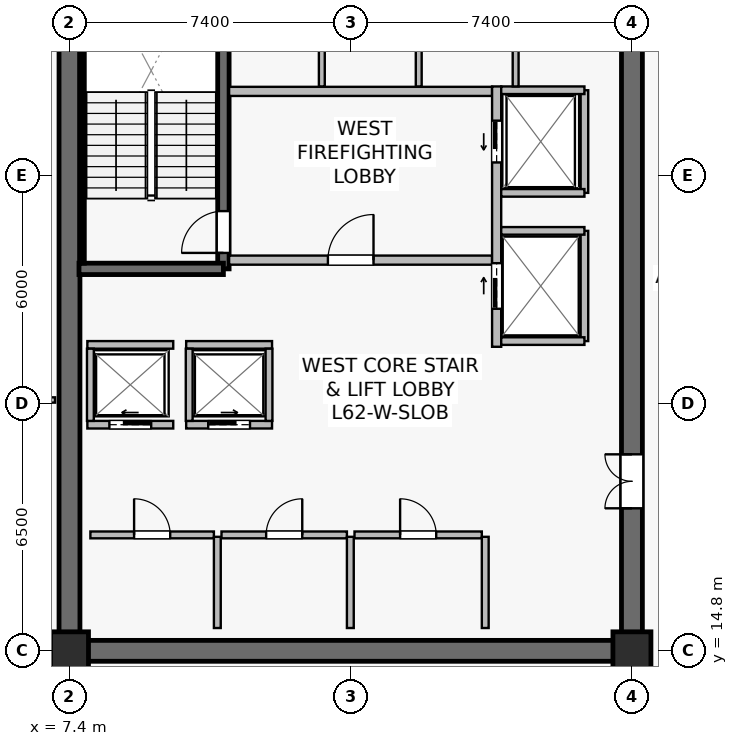
"""IFC4 building model, lengths in metres.
Left out: names, types, materials, properties, quantities, classifications, styles, units other than length and angle.
Written with IfcOpenShell. Run it as: python <this file> out.ifc"""

import sys

from ifc_helpers import new_model, si_unit, direction, frame, frame_2d, origin, origin_2d, place, context, subcontext, project, spatial, rectangle, extrude, source, transform, mapped, element, fill, save


model = new_model("IFC4")
c1 = context("Model", 3, precision=1e-05, world=origin(), true_north=direction((0.0, 1.0)))
c2 = subcontext(c1, "Body", "Model", "MODEL_VIEW")
j1 = project(units=[si_unit("LENGTHUNIT", "METRE"), si_unit("PLANEANGLEUNIT", "RADIAN")], contexts=[c1])
p1 = place(None, origin())
s1 = spatial("IfcSite", under=j1, at=p1, CompositionType="ELEMENT")
p2 = place(p1, origin())
s2 = spatial("IfcBuilding", under=s1, at=p2, CompositionType="ELEMENT")
p3 = place(p2, frame((0.0, 0.0, 258.8)))
s3 = spatial("IfcBuildingStorey", under=s2, at=p3, CompositionType="ELEMENT", Elevation=258.8)
p4 = place(p3, frame((7.125, 14.8, 0.0), z_axis=(0.0, 0.0, 1.0), x_axis=(1.0, 0.0, 0.0)))
e1 = element("IfcWall", 1, at=p4, inside=s3, PredefinedType="SHEAR", context=c2, shape_type="SweptSolid", body=[
    extrude(rectangle(XDim=15.35, YDim=0.55, at=frame_2d((7.675, 0.0))), origin(), (0.0, 0.0, 1.0), 3.8),
])
p5 = place(p3, frame((7.4, 15.075, 0.0), z_axis=(0.0, 0.0, 1.0), x_axis=(0.0, 1.0, 0.0)))
e2 = element("IfcWall", 2, at=p5, inside=s3, PredefinedType="SHEAR", context=c2, shape_type="SweptSolid", body=[
    extrude(rectangle(XDim=18.45, YDim=0.55, at=frame_2d((9.225, 0.0))), origin(), (0.0, 0.0, 1.0), 3.8),
])
p6 = place(p3, frame((22.2, 15.075, 0.0), z_axis=(0.0, 0.0, 1.0), x_axis=(0.0, 1.0, 0.0)))
e3 = element("IfcWall", 3, at=p6, inside=s3, PredefinedType="SHEAR", context=c2, shape_type="SweptSolid", body=[
    extrude(rectangle(XDim=18.45, YDim=0.55, at=frame_2d((9.225, 0.0))), origin(), (0.0, 0.0, 1.0), 3.8),
])
p7 = place(p6, frame((3.475, 0.0, 0.0)))
e4 = element("IfcOpeningElement", 4, at=p7, cuts=e3, PredefinedType="OPENING", context=c2, shape_type="SweptSolid", body=[
    extrude(rectangle(XDim=1.42, YDim=2.2, at=frame_2d((0.71, 1.1))), frame((0.0, 0.285, 0.0), z_axis=(0.0, -1.0, 0.0), x_axis=(1.0, 0.0, 0.0)), (0.0, 0.0, 1.0), 0.57),
])
p8 = place(p3, frame((11.45, 24.85, 0.0), z_axis=(0.0, 0.0, 1.0), x_axis=(0.0, 1.0, 0.0)))
e5 = element("IfcWall", 5, at=p8, inside=s3, PredefinedType="SHEAR", context=c2, shape_type="SweptSolid", body=[
    extrude(rectangle(XDim=8.63, YDim=0.3, at=frame_2d((4.315, 0.0))), origin(), (0.0, 0.0, 1.0), 3.8),
])
p9 = place(p8, frame((0.42, 0.0, 0.0)))
e6 = element("IfcOpeningElement", 6, at=p9, cuts=e5, PredefinedType="OPENING", context=c2, shape_type="SweptSolid", body=[
    extrude(rectangle(XDim=1.1, YDim=2.15, at=frame_2d((0.55, 1.075))), frame((0.0, 0.16, 0.0), z_axis=(0.0, -1.0, 0.0), x_axis=(1.0, 0.0, 0.0)), (0.0, 0.0, 1.0), 0.32),
])
p10 = place(p3, frame((7.65, 24.85, 0.0), z_axis=(0.0, 0.0, 1.0), x_axis=(1.0, 0.0, 0.0)))
e7 = element("IfcWall", 7, at=p10, inside=s3, PredefinedType="SHEAR", context=c2, shape_type="SweptSolid", body=[
    extrude(rectangle(XDim=3.8, YDim=0.3, at=frame_2d((1.9, 0.0))), origin(), (0.0, 0.0, 1.0), 3.8),
])
p11 = place(p3, frame((7.73, 25.0, 0.0), z_axis=(0.0, 0.0, 1.0), x_axis=(0.0, 1.0, 0.0)))
e8 = element("IfcWall", 8, at=p11, inside=s3, PredefinedType="SOLIDWALL", context=c2, shape_type="SweptSolid", body=[
    extrude(rectangle(XDim=8.32, YDim=0.12, at=frame_2d((4.16, 0.0))), origin(), (0.0, 0.0, 1.0), 3.8),
])
m1 = source(origin(), c2, "Body", "SweptSolid", [
    extrude(rectangle(XDim=1.0, YDim=1.0, at=origin_2d()), origin(), (0.0, 0.0, 1.0), 4.1),
])
for number, where, z_axis, x_axis in (
    (9, (7.4, 14.8, 0.0), (0.0, 0.0, 1.0), (1.0, 0.0, 0.0)),
    (10, (22.2, 14.8, 0.0), (0.0, 0.0, 1.0), (1.0, 0.0, 0.0)),
):
    element("IfcColumn", number, at=place(p3, frame(where, z_axis=z_axis, x_axis=x_axis)), inside=s3, PredefinedType="COLUMN", context=c2, shape_type="MappedRepresentation", body=[
        mapped(m1, transform((0.0, 0.0, 0.0), scale=1.0)),
    ])
p12 = place(p3, frame((11.6, 25.08, 0.0), z_axis=(0.0, 0.0, 1.0), x_axis=(1.0, 0.0, 0.0)))
e11 = element("IfcWall", 11, at=p12, inside=s3, PredefinedType="SOLIDWALL", context=c2, shape_type="SweptSolid", body=[
    extrude(rectangle(XDim=6.92, YDim=0.24, at=frame_2d((3.46, 0.0))), origin(), (0.0, 0.0, 1.0), 3.197),
])
p13 = place(p12, frame((2.6, 0.0, 0.0)))
e12 = element("IfcOpeningElement", 12, at=p13, cuts=e11, PredefinedType="OPENING", context=c2, shape_type="SweptSolid", body=[
    extrude(rectangle(XDim=1.2, YDim=2.16, at=frame_2d((0.6, 1.08))), frame((0.0, 0.13, 0.0), z_axis=(0.0, -1.0, 0.0), x_axis=(1.0, 0.0, 0.0)), (0.0, 0.0, 1.0), 0.26),
])
p14 = place(p3, frame((11.6, 29.52, 0.0), z_axis=(0.0, 0.0, 1.0), x_axis=(1.0, 0.0, 0.0)))
e13 = element("IfcWall", 13, at=p14, inside=s3, PredefinedType="SOLIDWALL", context=c2, shape_type="SweptSolid", body=[
    extrude(rectangle(XDim=6.92, YDim=0.24, at=frame_2d((3.46, 0.0))), origin(), (0.0, 0.0, 1.0), 3.197),
])
p15 = place(p3, frame((18.64, 22.8, 0.0), z_axis=(0.0, 0.0, 1.0), x_axis=(0.0, 1.0, 0.0)))
e14 = element("IfcWall", 14, at=p15, inside=s3, PredefinedType="SOLIDWALL", context=c2, shape_type="SweptSolid", body=[
    extrude(rectangle(XDim=6.85, YDim=0.24, at=frame_2d((3.425, 0.0))), origin(), (0.0, 0.0, 1.0), 2.935),
])
p16 = place(p15, frame((4.85, 0.0, 0.0)))
e15 = element("IfcOpeningElement", 15, at=p16, cuts=e14, PredefinedType="OPENING", context=c2, shape_type="SweptSolid", body=[
    extrude(rectangle(XDim=1.1, YDim=2.22, at=frame_2d((0.55, 1.11))), frame((0.0, 0.13, 0.0), z_axis=(0.0, -1.0, 0.0), x_axis=(1.0, 0.0, 0.0)), (0.0, 0.0, 1.0), 0.26),
])
p17 = place(p15, frame((1.0, 0.0, 0.0)))
e16 = element("IfcOpeningElement", 16, at=p17, cuts=e14, PredefinedType="OPENING", context=c2, shape_type="SweptSolid", body=[
    extrude(rectangle(XDim=1.2, YDim=2.22, at=frame_2d((0.6, 1.11))), frame((0.0, 0.13, 0.0), z_axis=(0.0, -1.0, 0.0), x_axis=(1.0, 0.0, 0.0)), (0.0, 0.0, 1.0), 0.26),
])
p18 = place(p3, frame((7.87, 20.75, 0.0), z_axis=(0.0, 0.0, 1.0), x_axis=(1.0, 0.0, 0.0)))
e17 = element("IfcWall", 17, at=p18, inside=s3, PredefinedType="SOLIDWALL", context=c2, shape_type="SweptSolid", body=[
    extrude(rectangle(XDim=2.26, YDim=0.2, at=frame_2d((1.13, 0.0))), origin(), (0.0, 0.0, 1.0), 3.8),
])
p19 = place(p18, frame((0.58, 0.0, 0.0)))
e18 = element("IfcOpeningElement", 18, at=p19, cuts=e17, PredefinedType="OPENING", context=c2, shape_type="SweptSolid", body=[
    extrude(rectangle(XDim=1.1, YDim=2.22, at=frame_2d((0.55, 1.11))), frame((0.0, 0.11, 0.0), z_axis=(0.0, -1.0, 0.0), x_axis=(1.0, 0.0, 0.0)), (0.0, 0.0, 1.0), 0.22),
])
p20 = place(p3, frame((7.87, 22.85, 0.0), z_axis=(0.0, 0.0, 1.0), x_axis=(1.0, 0.0, 0.0)))
e19 = element("IfcWall", 19, at=p20, inside=s3, PredefinedType="SOLIDWALL", context=c2, shape_type="SweptSolid", body=[
    extrude(rectangle(XDim=2.26, YDim=0.2, at=frame_2d((1.13, 0.0))), origin(), (0.0, 0.0, 1.0), 3.8),
])
p21 = place(p3, frame((7.95, 20.85, 0.0), z_axis=(0.0, 0.0, 1.0), x_axis=(0.0, 1.0, 0.0)))
e20 = element("IfcWall", 20, at=p21, inside=s3, PredefinedType="SOLIDWALL", context=c2, shape_type="SweptSolid", body=[
    extrude(rectangle(XDim=1.9, YDim=0.18, at=frame_2d((0.95, 0.0))), origin(), (0.0, 0.0, 1.0), 3.8),
])
p22 = place(p3, frame((10.47, 20.75, 0.0), z_axis=(0.0, 0.0, 1.0), x_axis=(1.0, 0.0, 0.0)))
e21 = element("IfcWall", 21, at=p22, inside=s3, PredefinedType="SOLIDWALL", context=c2, shape_type="SweptSolid", body=[
    extrude(rectangle(XDim=2.26, YDim=0.2, at=frame_2d((1.13, 0.0))), origin(), (0.0, 0.0, 1.0), 3.8),
])
p23 = place(p22, frame((0.58, 0.0, 0.0)))
e22 = element("IfcOpeningElement", 22, at=p23, cuts=e21, PredefinedType="OPENING", context=c2, shape_type="SweptSolid", body=[
    extrude(rectangle(XDim=1.1, YDim=2.22, at=frame_2d((0.55, 1.11))), frame((0.0, 0.11, 0.0), z_axis=(0.0, -1.0, 0.0), x_axis=(1.0, 0.0, 0.0)), (0.0, 0.0, 1.0), 0.22),
])
p24 = place(p3, frame((10.47, 22.85, 0.0), z_axis=(0.0, 0.0, 1.0), x_axis=(1.0, 0.0, 0.0)))
e23 = element("IfcWall", 23, at=p24, inside=s3, PredefinedType="SOLIDWALL", context=c2, shape_type="SweptSolid", body=[
    extrude(rectangle(XDim=2.26, YDim=0.2, at=frame_2d((1.13, 0.0))), origin(), (0.0, 0.0, 1.0), 3.8),
])
for number, where, z_axis, x_axis in (
    (24, (10.55, 20.85, 0.0), (0.0, 0.0, 1.0), (0.0, 1.0, 0.0)),
    (25, (12.65, 20.85, 0.0), (0.0, 0.0, 1.0), (0.0, 1.0, 0.0)),
):
    element("IfcWall", number, at=place(p3, frame(where, z_axis=z_axis, x_axis=x_axis)), inside=s3, PredefinedType="SOLIDWALL", context=c2, shape_type="SweptSolid", body=[
        extrude(rectangle(XDim=1.9, YDim=0.18, at=frame_2d((0.95, 0.0))), origin(), (0.0, 0.0, 1.0), 3.8),
    ])
p25 = place(p3, frame((20.95, 26.85, 0.0), z_axis=(0.0, 0.0, 1.0), x_axis=(0.0, 1.0, 0.0)))
e26 = element("IfcWall", 26, at=p25, inside=s3, PredefinedType="SOLIDWALL", context=c2, shape_type="SweptSolid", body=[
    extrude(rectangle(XDim=2.7, YDim=0.2, at=frame_2d((1.35, 0.0))), origin(), (0.0, 0.0, 1.0), 3.8),
])
p26 = place(p3, frame((18.76, 29.55, 0.0), z_axis=(0.0, 0.0, 1.0), x_axis=(1.0, 0.0, 0.0)))
e27 = element("IfcWall", 27, at=p26, inside=s3, PredefinedType="SOLIDWALL", context=c2, shape_type="SweptSolid", body=[
    extrude(rectangle(XDim=2.19, YDim=0.2, at=frame_2d((1.095, 0.0))), origin(), (0.0, 0.0, 1.0), 3.8),
])
p27 = place(p3, frame((18.76, 26.85, 0.0), z_axis=(0.0, 0.0, 1.0), x_axis=(1.0, 0.0, 0.0)))
e28 = element("IfcWall", 28, at=p27, inside=s3, PredefinedType="SOLIDWALL", context=c2, shape_type="SweptSolid", body=[
    extrude(rectangle(XDim=2.19, YDim=0.2, at=frame_2d((1.095, 0.0))), origin(), (0.0, 0.0, 1.0), 3.197),
])
p28 = place(p3, frame((20.95, 22.95, 0.0), z_axis=(0.0, 0.0, 1.0), x_axis=(0.0, 1.0, 0.0)))
e29 = element("IfcWall", 29, at=p28, inside=s3, PredefinedType="SOLIDWALL", context=c2, shape_type="SweptSolid", body=[
    extrude(rectangle(XDim=2.9, YDim=0.2, at=frame_2d((1.45, 0.0))), origin(), (0.0, 0.0, 1.0), 2.935),
])
for number, where, z_axis, x_axis in (
    (30, (18.76, 25.85, 0.0), (0.0, 0.0, 1.0), (1.0, 0.0, 0.0)),
    (31, (18.76, 22.95, 0.0), (0.0, 0.0, 1.0), (1.0, 0.0, 0.0)),
):
    element("IfcWall", number, at=place(p3, frame(where, z_axis=z_axis, x_axis=x_axis)), inside=s3, PredefinedType="SOLIDWALL", context=c2, shape_type="SweptSolid", body=[
        extrude(rectangle(XDim=2.19, YDim=0.2, at=frame_2d((1.095, 0.0))), origin(), (0.0, 0.0, 1.0), 3.8),
    ])
p29 = place(p3, frame((7.95, 17.85, 0.0), z_axis=(0.0, 0.0, 1.0), x_axis=(1.0, 0.0, 0.0)))
e32 = element("IfcWall", 32, at=p29, inside=s3, PredefinedType="SOLIDWALL", context=c2, shape_type="SweptSolid", body=[
    extrude(rectangle(XDim=3.25, YDim=0.18, at=frame_2d((1.625, 0.0))), origin(), (0.0, 0.0, 1.0), 3.8),
])
p30 = place(p29, frame((1.15, 0.0, 0.0)))
e33 = element("IfcOpeningElement", 33, at=p30, cuts=e32, PredefinedType="OPENING", context=c2, shape_type="SweptSolid", body=[
    extrude(rectangle(XDim=0.95, YDim=2.15, at=frame_2d((0.475, 1.075))), frame((0.0, 0.1, 0.0), z_axis=(0.0, -1.0, 0.0), x_axis=(1.0, 0.0, 0.0)), (0.0, 0.0, 1.0), 0.2),
])
p31 = place(p3, frame((11.29, 15.4, 0.0), z_axis=(0.0, 0.0, 1.0), x_axis=(0.0, 1.0, 0.0)))
e34 = element("IfcWall", 34, at=p31, inside=s3, PredefinedType="SOLIDWALL", context=c2, shape_type="SweptSolid", body=[
    extrude(rectangle(XDim=2.4, YDim=0.18, at=frame_2d((1.2, 0.0))), origin(), (0.0, 0.0, 1.0), 3.8),
])
p32 = place(p3, frame((11.4, 17.85, 0.0), z_axis=(0.0, 0.0, 1.0), x_axis=(1.0, 0.0, 0.0)))
e35 = element("IfcWall", 35, at=p32, inside=s3, PredefinedType="SOLIDWALL", context=c2, shape_type="SweptSolid", body=[
    extrude(rectangle(XDim=3.3, YDim=0.18, at=frame_2d((1.65, 0.0))), origin(), (0.0, 0.0, 1.0), 3.197),
])
p33 = place(p32, frame((1.175, 0.0, 0.0)))
e36 = element("IfcOpeningElement", 36, at=p33, cuts=e35, PredefinedType="OPENING", context=c2, shape_type="SweptSolid", body=[
    extrude(rectangle(XDim=0.95, YDim=2.15, at=frame_2d((0.475, 1.075))), frame((0.0, 0.1, 0.0), z_axis=(0.0, -1.0, 0.0), x_axis=(1.0, 0.0, 0.0)), (0.0, 0.0, 1.0), 0.2),
])
p34 = place(p3, frame((14.79, 15.4, 0.0), z_axis=(0.0, 0.0, 1.0), x_axis=(0.0, 1.0, 0.0)))
e37 = element("IfcWall", 37, at=p34, inside=s3, PredefinedType="SOLIDWALL", context=c2, shape_type="SweptSolid", body=[
    extrude(rectangle(XDim=2.4, YDim=0.18, at=frame_2d((1.2, 0.0))), origin(), (0.0, 0.0, 1.0), 3.197),
])
p35 = place(p3, frame((14.9, 17.85, 0.0), z_axis=(0.0, 0.0, 1.0), x_axis=(1.0, 0.0, 0.0)))
e38 = element("IfcWall", 38, at=p35, inside=s3, PredefinedType="SOLIDWALL", context=c2, shape_type="SweptSolid", body=[
    extrude(rectangle(XDim=3.35, YDim=0.18, at=frame_2d((1.675, 0.0))), origin(), (0.0, 0.0, 1.0), 3.197),
])
p36 = place(p35, frame((1.2, 0.0, 0.0)))
e39 = element("IfcOpeningElement", 39, at=p36, cuts=e38, PredefinedType="OPENING", context=c2, shape_type="SweptSolid", body=[
    extrude(rectangle(XDim=0.95, YDim=2.15, at=frame_2d((0.475, 1.075))), frame((0.0, 0.1, 0.0), z_axis=(0.0, -1.0, 0.0), x_axis=(1.0, 0.0, 0.0)), (0.0, 0.0, 1.0), 0.2),
])
p37 = place(p3, frame((18.34, 15.4, 0.0), z_axis=(0.0, 0.0, 1.0), x_axis=(0.0, 1.0, 0.0)))
e40 = element("IfcWall", 40, at=p37, inside=s3, PredefinedType="SOLIDWALL", context=c2, shape_type="SweptSolid", body=[
    extrude(rectangle(XDim=2.4, YDim=0.18, at=frame_2d((1.2, 0.0))), origin(), (0.0, 0.0, 1.0), 3.8),
])
for number, where, z_axis, x_axis in (
    (41, (14.04, 29.65, 0.0), (0.0, 0.0, 1.0), (0.0, 1.0, 0.0)),
    (42, (16.59, 29.65, 0.0), (0.0, 0.0, 1.0), (0.0, 1.0, 0.0)),
    (43, (19.14, 29.65, 0.0), (0.0, 0.0, 1.0), (0.0, 1.0, 0.0)),
):
    element("IfcWall", number, at=place(p3, frame(where, z_axis=z_axis, x_axis=x_axis)), inside=s3, PredefinedType="PLUMBINGWALL", context=c2, shape_type="SweptSolid", body=[
        extrude(rectangle(XDim=3.93, YDim=0.155, at=frame_2d((1.965, 0.0))), origin(), (0.0, 0.0, 1.0), 3.8),
    ])
p38 = place(p3, frame((4.11, 21.4, 0.0), z_axis=(0.0, 0.0, 1.0), x_axis=(1.0, 0.0, 0.0)))
e44 = element("IfcWall", 44, at=p38, inside=s3, PredefinedType="PARTITIONING", context=c2, shape_type="SweptSolid", body=[
    extrude(rectangle(XDim=2.91, YDim=0.14, at=frame_2d((1.455, 0.0))), origin(), (0.0, 0.0, 1.0), 3.8),
])
p39 = place(p3, frame((4.11, 14.505, 0.0), z_axis=(0.0, 0.0, 1.0), x_axis=(1.0, 0.0, 0.0)))
e45 = element("IfcWall", 45, at=p39, inside=s3, PredefinedType="PARTITIONING", context=c2, shape_type="SweptSolid", body=[
    extrude(rectangle(XDim=2.91, YDim=0.14, at=frame_2d((1.455, 0.0))), origin(), (0.0, 0.0, 1.0), 3.8),
])
p40 = place(p39, frame((1.005, 0.0, 0.0)))
e46 = element("IfcOpeningElement", 46, at=p40, cuts=e45, PredefinedType="OPENING", context=c2, shape_type="SweptSolid", body=[
    extrude(rectangle(XDim=0.9, YDim=2.1, at=frame_2d((0.45, 1.05))), frame((0.0, 0.08, 0.0), z_axis=(0.0, -1.0, 0.0), x_axis=(1.0, 0.0, 0.0)), (0.0, 0.0, 1.0), 0.16),
])
m2 = source(origin(), c2, "Body", "SweptSolid", [
    extrude(rectangle(XDim=1.1, YDim=2.15, at=frame_2d((0.55, 1.075))), frame((0.0, 0.025, 0.0), z_axis=(0.0, -1.0, 0.0), x_axis=(1.0, 0.0, 0.0)), (0.0, 0.0, 1.0), 0.05),
])
p41 = place(p9, origin())
e47 = element("IfcDoor", 47, at=p41, inside=s3, OperationType="SINGLE_SWING_LEFT", PredefinedType="DOOR", context=c2, shape_type="MappedRepresentation", body=[
    mapped(m2, transform((0.0, 0.0, 0.0), scale=1.0)),
])
fill(e6, e47)
m3 = source(origin(), c2, "Body", "SweptSolid", [
    extrude(rectangle(XDim=1.2, YDim=2.16, at=frame_2d((0.6, 1.08))), frame((0.0, 0.025, 0.0), z_axis=(0.0, -1.0, 0.0), x_axis=(1.0, 0.0, 0.0)), (0.0, 0.0, 1.0), 0.05),
])
p42 = place(p13, origin())
e48 = element("IfcDoor", 48, at=p42, inside=s3, OperationType="SINGLE_SWING_RIGHT", PredefinedType="DOOR", context=c2, shape_type="MappedRepresentation", body=[
    mapped(m3, transform((0.0, 0.0, 0.0), scale=1.0)),
])
fill(e12, e48)
m4 = source(origin(), c2, "Body", "SweptSolid", [
    extrude(rectangle(XDim=1.1, YDim=2.22, at=frame_2d((0.55, 1.11))), frame((0.0, 0.025, 0.0), z_axis=(0.0, -1.0, 0.0), x_axis=(1.0, 0.0, 0.0)), (0.0, 0.0, 1.0), 0.05),
])
p43 = place(p19, origin())
e49 = element("IfcDoor", 49, at=p43, inside=s3, OperationType="SLIDING_TO_LEFT", PredefinedType="USERDEFINED", context=c2, shape_type="MappedRepresentation", body=[
    mapped(m4, transform((0.0, 0.0, 0.0), scale=1.0)),
])
fill(e18, e49)
p44 = place(p23, origin())
e50 = element("IfcDoor", 50, at=p44, inside=s3, OperationType="SLIDING_TO_RIGHT", PredefinedType="USERDEFINED", context=c2, shape_type="MappedRepresentation", body=[
    mapped(m4, transform((0.0, 0.0, 0.0), scale=1.0)),
])
fill(e22, e50)
p45 = place(p16, origin())
e51 = element("IfcDoor", 51, at=p45, inside=s3, OperationType="SLIDING_TO_LEFT", PredefinedType="USERDEFINED", context=c2, shape_type="MappedRepresentation", body=[
    mapped(m4, transform((0.0, 0.0, 0.0), scale=1.0)),
])
fill(e15, e51)
m5 = source(origin(), c2, "Body", "SweptSolid", [
    extrude(rectangle(XDim=1.2, YDim=2.22, at=frame_2d((0.6, 1.11))), frame((0.0, 0.025, 0.0), z_axis=(0.0, -1.0, 0.0), x_axis=(1.0, 0.0, 0.0)), (0.0, 0.0, 1.0), 0.05),
])
p46 = place(p17, origin())
e52 = element("IfcDoor", 52, at=p46, inside=s3, OperationType="SLIDING_TO_RIGHT", PredefinedType="USERDEFINED", context=c2, shape_type="MappedRepresentation", body=[
    mapped(m5, transform((0.0, 0.0, 0.0), scale=1.0)),
])
fill(e16, e52)
m6 = source(origin(), c2, "Body", "SweptSolid", [
    extrude(rectangle(XDim=0.95, YDim=2.15, at=frame_2d((0.475, 1.075))), frame((0.0, 0.025, 0.0), z_axis=(0.0, -1.0, 0.0), x_axis=(1.0, 0.0, 0.0)), (0.0, 0.0, 1.0), 0.05),
])
p47 = place(p30, origin())
e53 = element("IfcDoor", 53, at=p47, inside=s3, OperationType="SINGLE_SWING_LEFT", PredefinedType="DOOR", context=c2, shape_type="MappedRepresentation", body=[
    mapped(m6, transform((0.0, 0.0, 0.0), scale=1.0)),
])
fill(e33, e53)
p48 = place(p33, origin())
e54 = element("IfcDoor", 54, at=p48, inside=s3, OperationType="SINGLE_SWING_RIGHT", PredefinedType="DOOR", context=c2, shape_type="MappedRepresentation", body=[
    mapped(m6, transform((0.0, 0.0, 0.0), scale=1.0)),
])
fill(e36, e54)
p49 = place(p36, origin())
e55 = element("IfcDoor", 55, at=p49, inside=s3, OperationType="SINGLE_SWING_LEFT", PredefinedType="DOOR", context=c2, shape_type="MappedRepresentation", body=[
    mapped(m6, transform((0.0, 0.0, 0.0), scale=1.0)),
])
fill(e39, e55)
m7 = source(origin(), c2, "Body", "SweptSolid", [
    extrude(rectangle(XDim=1.42, YDim=2.2, at=frame_2d((0.71, 1.1))), frame((0.0, 0.025, 0.0), z_axis=(0.0, -1.0, 0.0), x_axis=(1.0, 0.0, 0.0)), (0.0, 0.0, 1.0), 0.05),
])
p50 = place(p7, origin())
e56 = element("IfcDoor", 56, at=p50, inside=s3, OperationType="DOUBLE_DOOR_SINGLE_SWING", PredefinedType="DOOR", context=c2, shape_type="MappedRepresentation", body=[
    mapped(m7, transform((0.0, 0.0, 0.0), scale=1.0)),
])
fill(e4, e56)
save(model, sys.argv[1])
